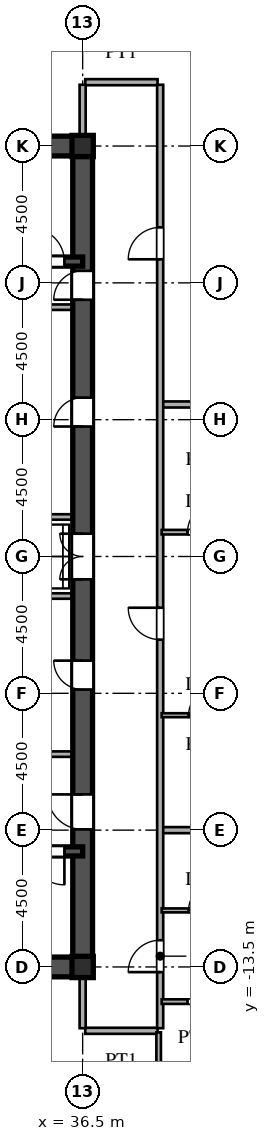
"""IFC4 building model, lengths in metres.
Left out: names, types, materials, properties, quantities, classifications, styles, units other than length and angle.
Written with IfcOpenShell. Run it as: python <this file> out.ifc"""

import sys

from ifc_helpers import new_model, si_unit, direction, frame, frame_2d, origin, origin_2d, place, context, subcontext, project, spatial, rectangle, i_section, extrude, source, transform, mapped, element, fill, save


model = new_model("IFC4")
c1 = context("Model", 3, precision=1e-05, world=origin(), true_north=direction((0.0, 1.0)))
c2 = subcontext(c1, "Body", "Model", "MODEL_VIEW")
j1 = project(units=[si_unit("LENGTHUNIT", "METRE"), si_unit("PLANEANGLEUNIT", "RADIAN")], contexts=[c1])
p1 = place(None, origin())
s1 = spatial("IfcSite", under=j1, at=p1, CompositionType="ELEMENT")
p2 = place(p1, origin())
s2 = spatial("IfcBuilding", under=s1, at=p2, CompositionType="ELEMENT")
p3 = place(p2, frame((0.0, 0.0, 128.4)))
s3 = spatial("IfcBuildingStorey", under=s2, at=p3, CompositionType="ELEMENT", Elevation=128.4)
m1 = source(origin(), c2, "Body", "SweptSolid", [
    extrude(i_section(OverallWidth=0.7, OverallDepth=0.7, WebThickness=0.028, FlangeThickness=0.045, at=origin_2d()), origin(), (0.0, 0.0, 1.0), 3.6),
])
for number, where, z_axis, x_axis in (
    (1, (36.5, -13.5, 0.0), (0.0, 0.0, 1.0), (1.0, 0.0, 0.0)),
    (2, (36.5, 13.5, 0.0), (0.0, 0.0, 1.0), (1.0, 0.0, 0.0)),
):
    element("IfcColumn", number, at=place(p3, frame(where, z_axis=z_axis, x_axis=x_axis)), inside=s3, PredefinedType="COLUMN", context=c2, shape_type="MappedRepresentation", body=[
        mapped(m1, transform((0.0, 0.0, 0.0), scale=1.0)),
    ])
for number, where, z_axis, x_axis in (
    (3, (27.5, -13.5, 0.0), (0.0, 0.0, 1.0), (1.0, 0.0, 0.0)),
    (4, (27.5, 13.5, 0.0), (0.0, 0.0, 1.0), (1.0, 0.0, 0.0)),
):
    element("IfcWall", number, at=place(p3, frame(where, z_axis=z_axis, x_axis=x_axis)), inside=s3, PredefinedType="SHEAR", context=c2, shape_type="SweptSolid", body=[
        extrude(rectangle(XDim=9.0, YDim=0.65, at=frame_2d((4.5, 0.0))), origin(), (0.0, 0.0, 1.0), 3.38),
    ])
p4 = place(p3, frame((36.5, -13.65, 0.0), z_axis=(0.0, 0.0, 1.0), x_axis=(0.0, 1.0, 0.0)))
e5 = element("IfcWall", 5, at=p4, inside=s3, PredefinedType="SHEAR", context=c2, shape_type="SweptSolid", body=[
    extrude(rectangle(XDim=7.15, YDim=0.65, at=frame_2d((3.575, 0.0))), origin(), (0.0, 0.0, 1.0), 3.38),
])
p5 = place(p4, frame((4.675, 0.0, 0.0)))
e6 = element("IfcOpeningElement", 6, at=p5, cuts=e5, PredefinedType="OPENING", context=c2, shape_type="SweptSolid", body=[
    extrude(rectangle(XDim=1.15, YDim=2.2, at=frame_2d((0.575, 1.1))), frame((0.0, 0.335, 0.0), z_axis=(0.0, -1.0, 0.0), x_axis=(1.0, 0.0, 0.0)), (0.0, 0.0, 1.0), 0.67),
])
p6 = place(p3, frame((36.5, -1.3, 0.0), z_axis=(0.0, 0.0, 1.0), x_axis=(0.0, 1.0, 0.0)))
e7 = element("IfcWall", 7, at=p6, inside=s3, PredefinedType="SHEAR", context=c2, shape_type="SweptSolid", body=[
    extrude(rectangle(XDim=2.6, YDim=0.65, at=frame_2d((1.3, 0.0))), origin(), (0.0, 0.0, 1.0), 3.38),
])
p7 = place(p6, frame((0.55, 0.0, 0.0)))
e8 = element("IfcOpeningElement", 8, at=p7, cuts=e7, PredefinedType="OPENING", context=c2, shape_type="SweptSolid", body=[
    extrude(rectangle(XDim=1.5, YDim=2.3, at=frame_2d((0.75, 1.15))), frame((0.0, 0.335, 0.0), z_axis=(0.0, -1.0, 0.0), x_axis=(1.0, 0.0, 0.0)), (0.0, 0.0, 1.0), 0.67),
])
p8 = place(p3, frame((36.5, 8.2, 0.0), z_axis=(0.0, 0.0, 1.0), x_axis=(0.0, 1.0, 0.0)))
e9 = element("IfcWall", 9, at=p8, inside=s3, PredefinedType="SHEAR", context=c2, shape_type="SweptSolid", body=[
    extrude(rectangle(XDim=5.45, YDim=0.65, at=frame_2d((2.725, 0.0))), origin(), (0.0, 0.0, 1.0), 3.38),
])
p9 = place(p8, frame((0.245, 0.0, 0.0)))
e10 = element("IfcOpeningElement", 10, at=p9, cuts=e9, PredefinedType="OPENING", context=c2, shape_type="SweptSolid", body=[
    extrude(rectangle(XDim=0.95, YDim=2.15, at=frame_2d((0.475, 1.075))), frame((0.0, 0.335, 0.0), z_axis=(0.0, -1.0, 0.0), x_axis=(1.0, 0.0, 0.0)), (0.0, 0.0, 1.0), 0.67),
])
p10 = place(p3, frame((36.5, -6.5, 0.0), z_axis=(0.0, 0.0, 1.0), x_axis=(0.0, 1.0, 0.0)))
e11 = element("IfcWall", 11, at=p10, inside=s3, PredefinedType="SHEAR", context=c2, shape_type="SweptSolid", body=[
    extrude(rectangle(XDim=5.2, YDim=0.65, at=frame_2d((2.6, 0.0))), origin(), (0.0, 0.0, 1.0), 3.38),
])
p11 = place(p10, frame((2.125, 0.0, 0.0)))
e12 = element("IfcOpeningElement", 12, at=p11, cuts=e11, PredefinedType="OPENING", context=c2, shape_type="SweptSolid", body=[
    extrude(rectangle(XDim=0.95, YDim=2.15, at=frame_2d((0.475, 1.075))), frame((0.0, 0.335, 0.0), z_axis=(0.0, -1.0, 0.0), x_axis=(1.0, 0.0, 0.0)), (0.0, 0.0, 1.0), 0.67),
])
p12 = place(p3, frame((36.5, 1.3, 0.0), z_axis=(0.0, 0.0, 1.0), x_axis=(0.0, 1.0, 0.0)))
e13 = element("IfcWall", 13, at=p12, inside=s3, PredefinedType="SHEAR", context=c2, shape_type="SweptSolid", body=[
    extrude(rectangle(XDim=6.9, YDim=0.65, at=frame_2d((3.45, 0.0))), origin(), (0.0, 0.0, 1.0), 3.38),
])
p13 = place(p12, frame((2.975, 0.0, 0.0)))
e14 = element("IfcOpeningElement", 14, at=p13, cuts=e13, PredefinedType="OPENING", context=c2, shape_type="SweptSolid", body=[
    extrude(rectangle(XDim=0.95, YDim=2.15, at=frame_2d((0.475, 1.075))), frame((0.0, 0.335, 0.0), z_axis=(0.0, -1.0, 0.0), x_axis=(1.0, 0.0, 0.0)), (0.0, 0.0, 1.0), 0.67),
])
p14 = place(p3, frame((27.5, -9.7, 0.0), z_axis=(0.0, 0.0, 1.0), x_axis=(1.0, 0.0, 0.0)))
e15 = element("IfcWall", 15, at=p14, inside=s3, PredefinedType="SHEAR", context=c2, shape_type="SweptSolid", body=[
    extrude(rectangle(XDim=9.0, YDim=0.3, at=frame_2d((4.5, 0.0))), origin(), (0.0, 0.0, 1.0), 3.38),
])
p15 = place(p14, frame((7.3, 0.0, 0.0)))
e16 = element("IfcOpeningElement", 16, at=p15, cuts=e15, PredefinedType="OPENING", context=c2, shape_type="SweptSolid", body=[
    extrude(rectangle(XDim=1.1, YDim=2.2, at=frame_2d((0.55, 1.1))), frame((0.0, 0.16, 0.0), z_axis=(0.0, -1.0, 0.0), x_axis=(1.0, 0.0, 0.0)), (0.0, 0.0, 1.0), 0.32),
])
p16 = place(p3, frame((27.5, 9.7, 0.0), z_axis=(0.0, 0.0, 1.0), x_axis=(1.0, 0.0, 0.0)))
e17 = element("IfcWall", 17, at=p16, inside=s3, PredefinedType="SHEAR", context=c2, shape_type="SweptSolid", body=[
    extrude(rectangle(XDim=9.0, YDim=0.3, at=frame_2d((4.5, 0.0))), origin(), (0.0, 0.0, 1.0), 3.38),
])
p17 = place(p16, frame((7.3, 0.0, 0.0)))
e18 = element("IfcOpeningElement", 18, at=p17, cuts=e17, PredefinedType="OPENING", context=c2, shape_type="SweptSolid", body=[
    extrude(rectangle(XDim=1.1, YDim=2.2, at=frame_2d((0.55, 1.1))), frame((0.0, 0.16, 0.0), z_axis=(0.0, -1.0, 0.0), x_axis=(1.0, 0.0, 0.0)), (0.0, 0.0, 1.0), 0.32),
])
for number, where, z_axis, x_axis in (
    (19, (30.45, -6.5, 0.0), (0.0, 0.0, 1.0), (1.0, 0.0, 0.0)),
    (20, (30.45, 8.2, 0.0), (0.0, 0.0, 1.0), (1.0, 0.0, 0.0)),
):
    element("IfcWall", number, at=place(p3, frame(where, z_axis=z_axis, x_axis=x_axis)), inside=s3, PredefinedType="PARTITIONING", context=c2, shape_type="SweptSolid", body=[
        extrude(rectangle(XDim=5.7, YDim=0.18, at=frame_2d((2.85, 0.0))), origin(), (0.0, 0.0, 1.0), 3.38),
    ])
for number, where, z_axis, x_axis in (
    (21, (33.2, -1.3, 0.0), (0.0, 0.0, 1.0), (1.0, 0.0, 0.0)),
    (22, (33.2, 1.3, 0.0), (0.0, 0.0, 1.0), (1.0, 0.0, 0.0)),
):
    element("IfcWall", number, at=place(p3, frame(where, z_axis=z_axis, x_axis=x_axis)), inside=s3, PredefinedType="PARTITIONING", context=c2, shape_type="SweptSolid", body=[
        extrude(rectangle(XDim=2.95, YDim=0.18, at=frame_2d((1.475, 0.0))), origin(), (0.0, 0.0, 1.0), 3.38),
    ])
p18 = place(p3, frame((36.585, -15.6, 0.0), z_axis=(0.0, 0.0, 1.0), x_axis=(1.0, 0.0, 0.0)))
e23 = element("IfcWall", 23, at=p18, inside=s3, PredefinedType="PARTITIONING", context=c2, shape_type="SweptSolid", body=[
    extrude(rectangle(XDim=2.38, YDim=0.2, at=frame_2d((1.19, 0.0))), origin(), (0.0, 0.0, 1.0), 3.38),
])
p19 = place(p3, frame((39.1, -14.64, 0.0), z_axis=(0.0, 0.0, 1.0), x_axis=(1.0, 0.0, 0.0)))
e24 = element("IfcWall", 24, at=p19, inside=s3, PredefinedType="PARTITIONING", context=c2, shape_type="SweptSolid", body=[
    extrude(rectangle(XDim=2.65, YDim=0.15, at=frame_2d((1.325, 0.0))), origin(), (0.0, 0.0, 1.0), 3.38),
])
p20 = place(p19, frame((0.85, 0.0, 0.0)))
e25 = element("IfcOpeningElement", 25, at=p20, cuts=e24, PredefinedType="OPENING", context=c2, shape_type="SweptSolid", body=[
    extrude(rectangle(XDim=0.95, YDim=2.15, at=frame_2d((0.475, 1.075))), frame((0.0, 0.085, 0.0), z_axis=(0.0, -1.0, 0.0), x_axis=(1.0, 0.0, 0.0)), (0.0, 0.0, 1.0), 0.17),
])
p21 = place(p3, frame((39.1, -11.64, 0.0), z_axis=(0.0, 0.0, 1.0), x_axis=(1.0, 0.0, 0.0)))
e26 = element("IfcWall", 26, at=p21, inside=s3, PredefinedType="PARTITIONING", context=c2, shape_type="SweptSolid", body=[
    extrude(rectangle(XDim=2.65, YDim=0.13, at=frame_2d((1.325, 0.0))), origin(), (0.0, 0.0, 1.0), 3.38),
])
p22 = place(p21, frame((0.885, 0.0, 0.0)))
e27 = element("IfcOpeningElement", 27, at=p22, cuts=e26, PredefinedType="OPENING", context=c2, shape_type="SweptSolid", body=[
    extrude(rectangle(XDim=0.88, YDim=2.1, at=frame_2d((0.44, 1.05))), frame((0.0, 0.075, 0.0), z_axis=(0.0, -1.0, 0.0), x_axis=(1.0, 0.0, 0.0)), (0.0, 0.0, 1.0), 0.15),
])
p23 = place(p3, frame((39.13, -9.0, 0.0), z_axis=(0.0, 0.0, 1.0), x_axis=(1.0, 0.0, 0.0)))
e28 = element("IfcWall", 28, at=p23, inside=s3, PredefinedType="PARTITIONING", context=c2, shape_type="SweptSolid", body=[
    extrude(rectangle(XDim=22.586, YDim=0.2, at=frame_2d((11.293, 0.0))), origin(), (0.0, 0.0, 1.0), 3.38),
])
p24 = place(p3, frame((39.1, -5.22, 0.0), z_axis=(0.0, 0.0, 1.0), x_axis=(1.0, 0.0, 0.0)))
e29 = element("IfcWall", 29, at=p24, inside=s3, PredefinedType="PARTITIONING", context=c2, shape_type="SweptSolid", body=[
    extrude(rectangle(XDim=2.65, YDim=0.13, at=frame_2d((1.325, 0.0))), origin(), (0.0, 0.0, 1.0), 3.38),
])
p25 = place(p24, frame((0.885, 0.0, 0.0)))
e30 = element("IfcOpeningElement", 30, at=p25, cuts=e29, PredefinedType="OPENING", context=c2, shape_type="SweptSolid", body=[
    extrude(rectangle(XDim=0.88, YDim=2.1, at=frame_2d((0.44, 1.05))), frame((0.0, 0.075, 0.0), z_axis=(0.0, -1.0, 0.0), x_axis=(1.0, 0.0, 0.0)), (0.0, 0.0, 1.0), 0.15),
])
p26 = place(p3, frame((39.1, 0.8, 0.0), z_axis=(0.0, 0.0, 1.0), x_axis=(1.0, 0.0, 0.0)))
e31 = element("IfcWall", 31, at=p26, inside=s3, PredefinedType="PARTITIONING", context=c2, shape_type="SweptSolid", body=[
    extrude(rectangle(XDim=2.65, YDim=0.15, at=frame_2d((1.325, 0.0))), origin(), (0.0, 0.0, 1.0), 3.38),
])
p27 = place(p26, frame((0.85, 0.0, 0.0)))
e32 = element("IfcOpeningElement", 32, at=p27, cuts=e31, PredefinedType="OPENING", context=c2, shape_type="SweptSolid", body=[
    extrude(rectangle(XDim=0.95, YDim=2.15, at=frame_2d((0.475, 1.075))), frame((0.0, 0.085, 0.0), z_axis=(0.0, -1.0, 0.0), x_axis=(1.0, 0.0, 0.0)), (0.0, 0.0, 1.0), 0.17),
])
p28 = place(p3, frame((39.13, 5.0, 0.0), z_axis=(0.0, 0.0, 1.0), x_axis=(1.0, 0.0, 0.0)))
e33 = element("IfcWall", 33, at=p28, inside=s3, PredefinedType="PARTITIONING", context=c2, shape_type="SweptSolid", body=[
    extrude(rectangle(XDim=30.096, YDim=0.2, at=frame_2d((15.048, 0.0))), origin(), (0.0, 0.0, 1.0), 3.38),
])
p29 = place(p3, frame((36.585, 15.6, 0.0), z_axis=(0.0, 0.0, 1.0), x_axis=(1.0, 0.0, 0.0)))
e34 = element("IfcWall", 34, at=p29, inside=s3, PredefinedType="PARTITIONING", context=c2, shape_type="SweptSolid", body=[
    extrude(rectangle(XDim=2.38, YDim=0.2, at=frame_2d((1.19, 0.0))), origin(), (0.0, 0.0, 1.0), 3.38),
])
for number, where, z_axis, x_axis in (
    (35, (36.5, -15.515, 0.0), (0.0, 0.0, 1.0), (0.0, 1.0, 0.0)),
    (36, (36.5, 13.83, 0.0), (0.0, 0.0, 1.0), (0.0, 1.0, 0.0)),
):
    element("IfcWall", number, at=place(p3, frame(where, z_axis=z_axis, x_axis=x_axis)), inside=s3, PredefinedType="PARTITIONING", context=c2, shape_type="SweptSolid", body=[
        extrude(rectangle(XDim=1.685, YDim=0.2, at=frame_2d((0.842, 0.0))), origin(), (0.0, 0.0, 1.0), 2.78),
    ])
p30 = place(p3, frame((39.0, -20.686, 0.0), z_axis=(0.0, 0.0, 1.0), x_axis=(0.0, 1.0, 0.0)))
e37 = element("IfcWall", 37, at=p30, inside=s3, PredefinedType="PARTITIONING", context=c2, shape_type="SweptSolid", body=[
    extrude(rectangle(XDim=5.036, YDim=0.15, at=frame_2d((2.518, 0.0))), origin(), (0.0, 0.0, 1.0), 3.38),
])
p31 = place(p30, frame((0.385, 0.0, 0.0)))
e38 = element("IfcOpeningElement", 38, at=p31, cuts=e37, PredefinedType="OPENING", context=c2, shape_type="SweptSolid", body=[
    extrude(rectangle(XDim=0.95, YDim=2.15, at=frame_2d((0.475, 1.075))), frame((0.0, 0.085, 0.0), z_axis=(0.0, -1.0, 0.0), x_axis=(1.0, 0.0, 0.0)), (0.0, 0.0, 1.0), 0.17),
])
p32 = place(p30, frame((2.911, 0.0, 0.0)))
e39 = element("IfcOpeningElement", 39, at=p32, cuts=e37, PredefinedType="OPENING", context=c2, shape_type="SweptSolid", body=[
    extrude(rectangle(XDim=0.95, YDim=2.15, at=frame_2d((0.475, 1.075))), frame((0.0, 0.085, 0.0), z_axis=(0.0, -1.0, 0.0), x_axis=(1.0, 0.0, 0.0)), (0.0, 0.0, 1.0), 0.17),
])
p33 = place(p3, frame((39.05, -15.515, 0.0), z_axis=(0.0, 0.0, 1.0), x_axis=(0.0, 1.0, 0.0)))
e40 = element("IfcWall", 40, at=p33, inside=s3, PredefinedType="PARTITIONING", context=c2, shape_type="SweptSolid", body=[
    extrude(rectangle(XDim=31.03, YDim=0.2, at=frame_2d((15.515, 0.0))), origin(), (0.0, 0.0, 1.0), 3.38),
])
p34 = place(p33, frame((1.845, 0.0, 0.0)))
e41 = element("IfcOpeningElement", 41, at=p34, cuts=e40, PredefinedType="OPENING", context=c2, shape_type="SweptSolid", body=[
    extrude(rectangle(XDim=1.05, YDim=2.25, at=frame_2d((0.525, 1.125))), frame((0.0, 0.11, 0.0), z_axis=(0.0, -1.0, 0.0), x_axis=(1.0, 0.0, 0.0)), (0.0, 0.0, 1.0), 0.22),
])
p35 = place(p33, frame((12.78, 0.0, 0.0)))
e42 = element("IfcOpeningElement", 42, at=p35, cuts=e40, PredefinedType="OPENING", context=c2, shape_type="SweptSolid", body=[
    extrude(rectangle(XDim=1.05, YDim=2.25, at=frame_2d((0.525, 1.125))), frame((0.0, 0.11, 0.0), z_axis=(0.0, -1.0, 0.0), x_axis=(1.0, 0.0, 0.0)), (0.0, 0.0, 1.0), 0.22),
])
p36 = place(p33, frame((25.29, 0.0, 0.0)))
e43 = element("IfcOpeningElement", 43, at=p36, cuts=e40, PredefinedType="OPENING", context=c2, shape_type="SweptSolid", body=[
    extrude(rectangle(XDim=1.05, YDim=2.25, at=frame_2d((0.525, 1.125))), frame((0.0, 0.11, 0.0), z_axis=(0.0, -1.0, 0.0), x_axis=(1.0, 0.0, 0.0)), (0.0, 0.0, 1.0), 0.22),
])
m2 = source(origin(), c2, "Body", "SweptSolid", [
    extrude(rectangle(XDim=1.15, YDim=2.2, at=frame_2d((0.575, 1.1))), frame((0.0, 0.025, 0.0), z_axis=(0.0, -1.0, 0.0), x_axis=(1.0, 0.0, 0.0)), (0.0, 0.0, 1.0), 0.05),
])
p37 = place(p5, origin())
e44 = element("IfcDoor", 44, at=p37, inside=s3, OperationType="SINGLE_SWING_RIGHT", PredefinedType="DOOR", context=c2, shape_type="MappedRepresentation", body=[
    mapped(m2, transform((0.0, 0.0, 0.0), scale=1.0)),
])
fill(e6, e44)
m3 = source(origin(), c2, "Body", "SweptSolid", [
    extrude(rectangle(XDim=1.5, YDim=2.3, at=frame_2d((0.75, 1.15))), frame((0.0, 0.025, 0.0), z_axis=(0.0, -1.0, 0.0), x_axis=(1.0, 0.0, 0.0)), (0.0, 0.0, 1.0), 0.05),
])
p38 = place(p7, origin())
e45 = element("IfcDoor", 45, at=p38, inside=s3, OperationType="DOUBLE_SWING_LEFT", PredefinedType="DOOR", context=c2, shape_type="MappedRepresentation", body=[
    mapped(m3, transform((0.0, 0.0, 0.0), scale=1.0)),
])
fill(e8, e45)
m4 = source(origin(), c2, "Body", "SweptSolid", [
    extrude(rectangle(XDim=0.95, YDim=2.15, at=frame_2d((0.475, 1.075))), frame((0.0, 0.025, 0.0), z_axis=(0.0, -1.0, 0.0), x_axis=(1.0, 0.0, 0.0)), (0.0, 0.0, 1.0), 0.05),
])
p39 = place(p9, origin())
e46 = element("IfcDoor", 46, at=p39, inside=s3, OperationType="SINGLE_SWING_LEFT", PredefinedType="DOOR", context=c2, shape_type="MappedRepresentation", body=[
    mapped(m4, transform((0.0, 0.0, 0.0), scale=1.0)),
])
fill(e10, e46)
p40 = place(p11, origin())
e47 = element("IfcDoor", 47, at=p40, inside=s3, OperationType="SINGLE_SWING_RIGHT", PredefinedType="DOOR", context=c2, shape_type="MappedRepresentation", body=[
    mapped(m4, transform((0.0, 0.0, 0.0), scale=1.0)),
])
fill(e12, e47)
p41 = place(p13, origin())
e48 = element("IfcDoor", 48, at=p41, inside=s3, OperationType="SINGLE_SWING_LEFT", PredefinedType="DOOR", context=c2, shape_type="MappedRepresentation", body=[
    mapped(m4, transform((0.0, 0.0, 0.0), scale=1.0)),
])
fill(e14, e48)
m5 = source(origin(), c2, "Body", "SweptSolid", [
    extrude(rectangle(XDim=1.1, YDim=2.2, at=frame_2d((0.55, 1.1))), frame((0.0, 0.025, 0.0), z_axis=(0.0, -1.0, 0.0), x_axis=(1.0, 0.0, 0.0)), (0.0, 0.0, 1.0), 0.05),
])
p42 = place(p15, frame((1.1, 0.0, 0.0), z_axis=(0.0, 0.0, 1.0), x_axis=(-1.0, 0.0, 0.0)))
e49 = element("IfcDoor", 49, at=p42, inside=s3, OperationType="SINGLE_SWING_RIGHT", PredefinedType="DOOR", context=c2, shape_type="MappedRepresentation", body=[
    mapped(m5, transform((0.0, 0.0, 0.0), scale=1.0)),
])
fill(e16, e49)
p43 = place(p17, origin())
e50 = element("IfcDoor", 50, at=p43, inside=s3, OperationType="SINGLE_SWING_LEFT", PredefinedType="DOOR", context=c2, shape_type="MappedRepresentation", body=[
    mapped(m5, transform((0.0, 0.0, 0.0), scale=1.0)),
])
fill(e18, e50)
m6 = source(origin(), c2, "Body", "SweptSolid", [
    extrude(rectangle(XDim=0.88, YDim=2.1, at=frame_2d((0.44, 1.05))), frame((0.0, 0.025, 0.0), z_axis=(0.0, -1.0, 0.0), x_axis=(1.0, 0.0, 0.0)), (0.0, 0.0, 1.0), 0.05),
])
p44 = place(p22, origin())
e51 = element("IfcDoor", 51, at=p44, inside=s3, OperationType="SINGLE_SWING_RIGHT", PredefinedType="DOOR", context=c2, shape_type="MappedRepresentation", body=[
    mapped(m6, transform((0.0, 0.0, 0.0), scale=1.0)),
])
fill(e27, e51)
p45 = place(p25, origin())
e52 = element("IfcDoor", 52, at=p45, inside=s3, OperationType="SINGLE_SWING_RIGHT", PredefinedType="DOOR", context=c2, shape_type="MappedRepresentation", body=[
    mapped(m6, transform((0.0, 0.0, 0.0), scale=1.0)),
])
fill(e30, e52)
m7 = source(origin(), c2, "Body", "SweptSolid", [
    extrude(rectangle(XDim=0.95, YDim=2.15, at=frame_2d((0.475, 1.075))), frame((0.0, 0.025, 0.0), z_axis=(0.0, -1.0, 0.0), x_axis=(1.0, 0.0, 0.0)), (0.0, 0.0, 1.0), 0.05),
])
p46 = place(p27, origin())
e53 = element("IfcDoor", 53, at=p46, inside=s3, OperationType="SINGLE_SWING_RIGHT", PredefinedType="DOOR", context=c2, shape_type="MappedRepresentation", body=[
    mapped(m7, transform((0.0, 0.0, 0.0), scale=1.0)),
])
fill(e32, e53)
m8 = source(origin(), c2, "Body", "SweptSolid", [
    extrude(rectangle(XDim=1.05, YDim=2.25, at=frame_2d((0.525, 1.125))), frame((0.0, 0.025, 0.0), z_axis=(0.0, -1.0, 0.0), x_axis=(1.0, 0.0, 0.0)), (0.0, 0.0, 1.0), 0.05),
])
p47 = place(p34, origin())
e54 = element("IfcDoor", 54, at=p47, inside=s3, OperationType="SINGLE_SWING_LEFT", PredefinedType="DOOR", context=c2, shape_type="MappedRepresentation", body=[
    mapped(m8, transform((0.0, 0.0, 0.0), scale=1.0)),
])
fill(e41, e54)
p48 = place(p35, origin())
e55 = element("IfcDoor", 55, at=p48, inside=s3, OperationType="SINGLE_SWING_RIGHT", PredefinedType="DOOR", context=c2, shape_type="MappedRepresentation", body=[
    mapped(m8, transform((0.0, 0.0, 0.0), scale=1.0)),
])
fill(e42, e55)
p49 = place(p36, origin())
e56 = element("IfcDoor", 56, at=p49, inside=s3, OperationType="SINGLE_SWING_LEFT", PredefinedType="DOOR", context=c2, shape_type="MappedRepresentation", body=[
    mapped(m8, transform((0.0, 0.0, 0.0), scale=1.0)),
])
fill(e43, e56)
save(model, sys.argv[1])
